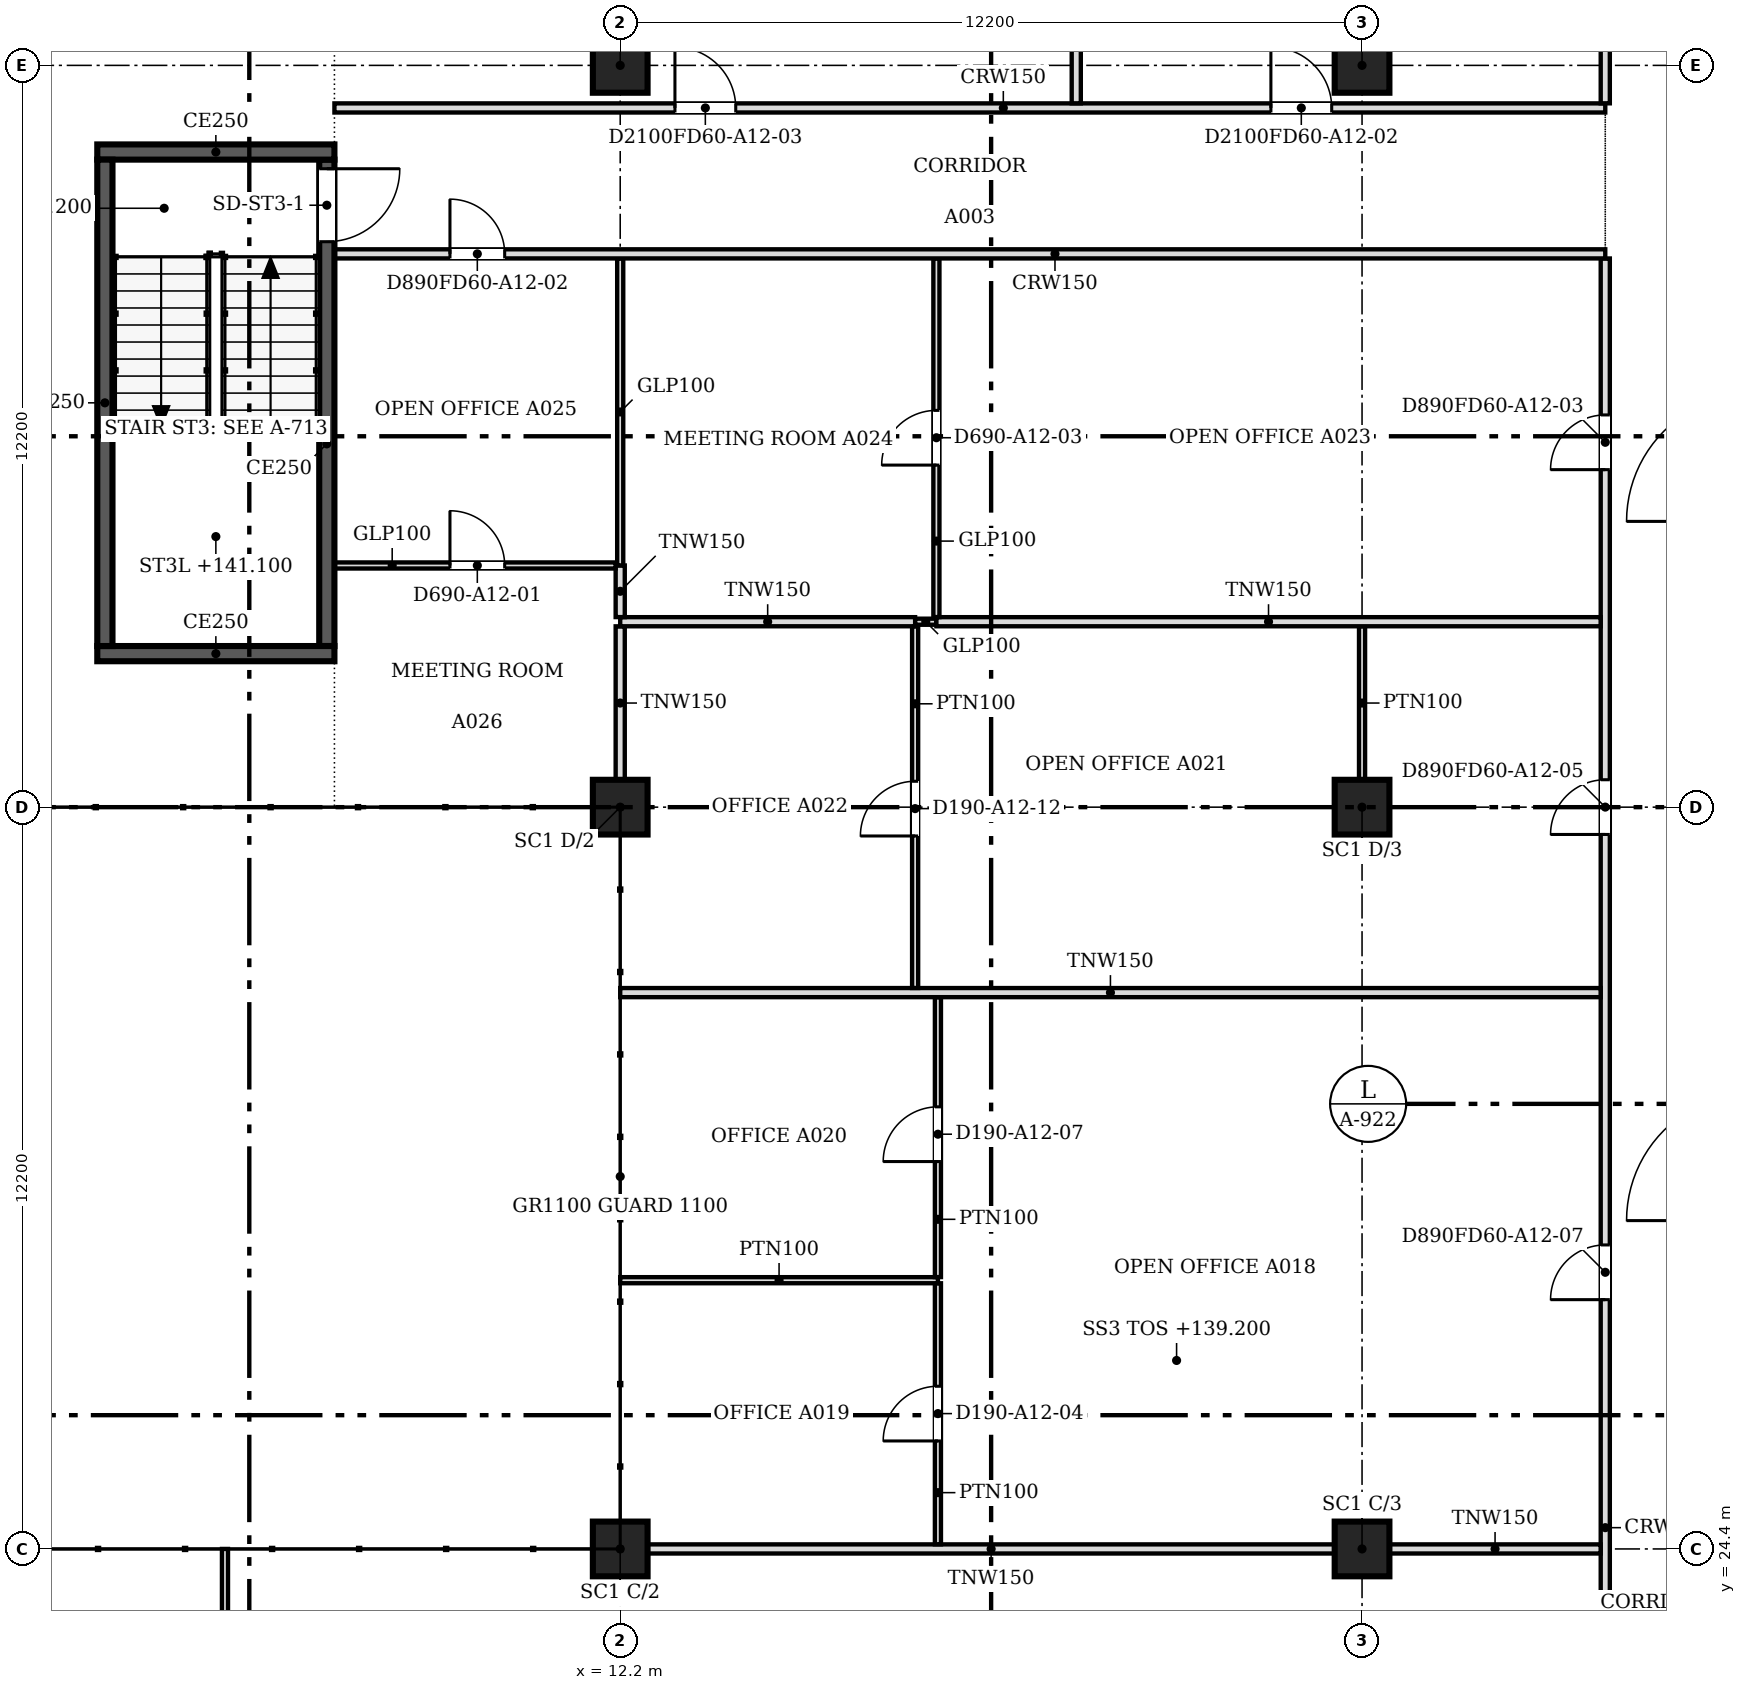
"""IFC4 building model, lengths in metres.
Left out: names, types, materials, properties, quantities, classifications, styles, units other than length and angle.
Written with IfcOpenShell. Run it as: python <this file> out.ifc"""

import sys

from ifc_helpers import new_model, si_unit, direction, frame, frame_2d, origin, origin_2d, place, context, subcontext, project, spatial, rectangle, extrude, source, transform, mapped, element, fill, save


model = new_model("IFC4")
c1 = context("Model", 3, precision=1e-05, world=origin(), true_north=direction((0.0, 1.0)))
c2 = subcontext(c1, "Body", "Model", "MODEL_VIEW")
j1 = project(units=[si_unit("LENGTHUNIT", "METRE"), si_unit("PLANEANGLEUNIT", "RADIAN")], contexts=[c1])
p1 = place(None, origin())
s1 = spatial("IfcSite", under=j1, at=p1, CompositionType="ELEMENT")
p2 = place(p1, origin())
s2 = spatial("IfcBuilding", under=s1, at=p2, CompositionType="ELEMENT")
p3 = place(p2, frame((0.0, 0.0, 139.2)))
s3 = spatial("IfcBuildingStorey", under=s2, at=p3, CompositionType="ELEMENT", Elevation=139.2)
for number, where, z_axis, x_axis in (
    (1, (12.2, 24.4, 0.0), (0.0, 0.0, 1.0), (1.0, 0.0, 0.0)),
    (2, (12.2, 36.6, 0.0), (0.0, 0.0, 1.0), (1.0, 0.0, 0.0)),
    (3, (12.2, 48.8, 0.0), (0.0, 0.0, 1.0), (1.0, 0.0, 0.0)),
    (4, (24.4, 24.4, 0.0), (0.0, 0.0, 1.0), (1.0, 0.0, 0.0)),
    (5, (24.4, 36.6, 0.0), (0.0, 0.0, 1.0), (1.0, 0.0, 0.0)),
    (6, (24.4, 48.8, 0.0), (0.0, 0.0, 1.0), (1.0, 0.0, 0.0)),
):
    element("IfcColumn", number, at=place(p3, frame(where, z_axis=z_axis, x_axis=x_axis)), inside=s3, PredefinedType="COLUMN", context=c2, shape_type="SweptSolid", body=[
        extrude(rectangle(XDim=0.9, YDim=0.9, at=origin_2d()), origin(), (0.0, 0.0, 1.0), 3.6),
    ])
p4 = place(p3, frame((7.5, 39.125, 0.0), z_axis=(0.0, 0.0, 1.0), x_axis=(-1.0, 0.0, 0.0)))
e7 = element("IfcWall", 7, at=p4, inside=s3, PredefinedType="SOLIDWALL", context=c2, shape_type="SweptSolid", body=[
    extrude(rectangle(XDim=3.9, YDim=0.25, at=frame_2d((1.95, 0.0))), origin(), (0.0, 0.0, 1.0), 3.8),
])
p5 = place(p3, frame((3.725, 39.25, 0.0), z_axis=(0.0, 0.0, 1.0), x_axis=(0.0, 1.0, 0.0)))
e8 = element("IfcWall", 8, at=p5, inside=s3, PredefinedType="SOLIDWALL", context=c2, shape_type="SweptSolid", body=[
    extrude(rectangle(XDim=8.0, YDim=0.25, at=frame_2d((4.0, 0.0))), origin(), (0.0, 0.0, 1.0), 3.8),
])
p6 = place(p3, frame((3.6, 47.375, 0.0), z_axis=(0.0, 0.0, 1.0), x_axis=(1.0, 0.0, 0.0)))
e9 = element("IfcWall", 9, at=p6, inside=s3, PredefinedType="SOLIDWALL", context=c2, shape_type="SweptSolid", body=[
    extrude(rectangle(XDim=3.9, YDim=0.25, at=frame_2d((1.95, 0.0))), origin(), (0.0, 0.0, 1.0), 3.8),
])
p7 = place(p3, frame((7.375, 47.25, 0.0), z_axis=(0.0, 0.0, 1.0), x_axis=(0.0, -1.0, 0.0)))
e10 = element("IfcWall", 10, at=p7, inside=s3, PredefinedType="SOLIDWALL", context=c2, shape_type="SweptSolid", body=[
    extrude(rectangle(XDim=8.0, YDim=0.25, at=frame_2d((4.0, 0.0))), origin(), (0.0, 0.0, 1.0), 3.8),
])
m1 = source(origin(), c2, "Body", "SweptSolid", [
    extrude(rectangle(XDim=1.2, YDim=2.1, at=frame_2d((0.6, 1.05))), frame((0.0, 0.135, 0.0), z_axis=(0.0, -1.0, 0.0), x_axis=(1.0, 0.0, 0.0)), (0.0, 0.0, 1.0), 0.27),
])
p8 = place(p7, frame((0.15, 0.0, 0.0)))
e11 = element("IfcOpeningElement", 11, at=p8, cuts=e10, PredefinedType="OPENING", context=c2, shape_type="MappedRepresentation", body=[
    mapped(m1, transform((0.0, 0.0, 0.0), scale=1.0)),
])
p9 = place(p3, frame((28.4, 18.8, 0.0), z_axis=(0.0, 0.0, 1.0), x_axis=(0.0, 1.0, 0.0)))
e12 = element("IfcWall", 12, at=p9, inside=s3, PredefinedType="PARTITIONING", context=c2, shape_type="SweptSolid", body=[
    extrude(rectangle(XDim=26.824, YDim=0.15, at=frame_2d((13.412, 0.0))), origin(), (0.0, 0.0, 1.0), 3.067),
])
m2 = source(origin(), c2, "Body", "SweptSolid", [
    extrude(rectangle(XDim=0.9, YDim=2.1, at=frame_2d((0.45, 1.05))), frame((0.0, 0.085, 0.0), z_axis=(0.0, -1.0, 0.0), x_axis=(1.0, 0.0, 0.0)), (0.0, 0.0, 1.0), 0.17),
])
p10 = place(p9, frame((1.3, 0.0, 0.0)))
e13 = element("IfcOpeningElement", 13, at=p10, cuts=e12, PredefinedType="OPENING", context=c2, shape_type="MappedRepresentation", body=[
    mapped(m2, transform((0.0, 0.0, 0.0), scale=1.0)),
])
p11 = place(p9, frame((23.351, 0.0, 0.0)))
e14 = element("IfcOpeningElement", 14, at=p11, cuts=e12, PredefinedType="OPENING", context=c2, shape_type="MappedRepresentation", body=[
    mapped(m2, transform((0.0, 0.0, 0.0), scale=1.0)),
])
p12 = place(p9, frame((17.351, 0.0, 0.0)))
e15 = element("IfcOpeningElement", 15, at=p12, cuts=e12, PredefinedType="OPENING", context=c2, shape_type="MappedRepresentation", body=[
    mapped(m2, transform((0.0, 0.0, 0.0), scale=1.0)),
])
p13 = place(p9, frame((9.7, 0.0, 0.0)))
e16 = element("IfcOpeningElement", 16, at=p13, cuts=e12, PredefinedType="OPENING", context=c2, shape_type="MappedRepresentation", body=[
    mapped(m2, transform((0.0, 0.0, 0.0), scale=1.0)),
])
p14 = place(p3, frame((5.7, 18.99, 0.0), z_axis=(0.0, 0.0, 1.0), x_axis=(0.0, 1.0, 0.0)))
e17 = element("IfcWall", 17, at=p14, inside=s3, PredefinedType="PARTITIONING", context=c2, shape_type="SweptSolid", body=[
    extrude(rectangle(XDim=5.41, YDim=0.1, at=frame_2d((2.705, 0.0))), origin(), (0.0, 0.0, 1.0), 3.067),
])
m3 = source(origin(), c2, "Body", "SweptSolid", [
    extrude(rectangle(XDim=0.9, YDim=2.1, at=frame_2d((0.45, 1.05))), frame((0.0, 0.06, 0.0), z_axis=(0.0, -1.0, 0.0), x_axis=(1.0, 0.0, 0.0)), (0.0, 0.0, 1.0), 0.12),
])
p15 = place(p14, frame((2.3, 0.0, 0.0)))
e18 = element("IfcOpeningElement", 18, at=p15, cuts=e17, PredefinedType="OPENING", context=c2, shape_type="MappedRepresentation", body=[
    mapped(m3, transform((0.0, 0.0, 0.0), scale=1.0)),
])
p16 = place(p3, frame((12.651, 24.4, 0.0), z_axis=(0.0, 0.0, 1.0), x_axis=(1.0, 0.0, 0.0)))
e19 = element("IfcWall", 19, at=p16, inside=s3, PredefinedType="PARTITIONING", context=c2, shape_type="SweptSolid", body=[
    extrude(rectangle(XDim=11.298, YDim=0.15, at=frame_2d((5.649, 0.0))), origin(), (0.0, 0.0, 1.0), 3.067),
])
p17 = place(p3, frame((24.851, 24.4, 0.0), z_axis=(0.0, 0.0, 1.0), x_axis=(1.0, 0.0, 0.0)))
e20 = element("IfcWall", 20, at=p17, inside=s3, PredefinedType="PARTITIONING", context=c2, shape_type="SweptSolid", body=[
    extrude(rectangle(XDim=3.473, YDim=0.15, at=frame_2d((1.736, 0.0))), origin(), (0.0, 0.0, 1.0), 3.067),
])
p18 = place(p3, frame((17.425, 24.476, 0.0), z_axis=(0.0, 0.0, 1.0), x_axis=(0.0, 1.0, 0.0)))
e21 = element("IfcWall", 21, at=p18, inside=s3, PredefinedType="PARTITIONING", context=c2, shape_type="SweptSolid", body=[
    extrude(rectangle(XDim=4.293, YDim=0.1, at=frame_2d((2.146, 0.0))), origin(), (0.0, 0.0, 1.0), 3.067),
])
p19 = place(p18, frame((1.7, 0.0, 0.0)))
e22 = element("IfcOpeningElement", 22, at=p19, cuts=e21, PredefinedType="OPENING", context=c2, shape_type="MappedRepresentation", body=[
    mapped(m3, transform((0.0, 0.0, 0.0), scale=1.0)),
])
p20 = place(p3, frame((12.2, 28.82, 0.0), z_axis=(0.0, 0.0, 1.0), x_axis=(1.0, 0.0, 0.0)))
e23 = element("IfcWall", 23, at=p20, inside=s3, PredefinedType="PARTITIONING", context=c2, shape_type="SweptSolid", body=[
    extrude(rectangle(XDim=5.225, YDim=0.1, at=frame_2d((2.613, 0.0))), origin(), (0.0, 0.0, 1.0), 3.067),
])
p21 = place(p3, frame((17.425, 28.871, 0.0), z_axis=(0.0, 0.0, 1.0), x_axis=(0.0, 1.0, 0.0)))
e24 = element("IfcWall", 24, at=p21, inside=s3, PredefinedType="PARTITIONING", context=c2, shape_type="SweptSolid", body=[
    extrude(rectangle(XDim=4.603, YDim=0.1, at=frame_2d((2.301, 0.0))), origin(), (0.0, 0.0, 1.0), 3.067),
])
p22 = place(p21, frame((1.9, 0.0, 0.0)))
e25 = element("IfcOpeningElement", 25, at=p22, cuts=e24, PredefinedType="OPENING", context=c2, shape_type="MappedRepresentation", body=[
    mapped(m3, transform((0.0, 0.0, 0.0), scale=1.0)),
])
p23 = place(p3, frame((12.2, 33.55, 0.0), z_axis=(0.0, 0.0, 1.0), x_axis=(1.0, 0.0, 0.0)))
e26 = element("IfcWall", 26, at=p23, inside=s3, PredefinedType="PARTITIONING", context=c2, shape_type="SweptSolid", body=[
    extrude(rectangle(XDim=16.124, YDim=0.15, at=frame_2d((8.062, 0.0))), origin(), (0.0, 0.0, 1.0), 3.067),
])
p24 = place(p3, frame((17.05, 33.626, 0.0), z_axis=(0.0, 0.0, 1.0), x_axis=(0.0, 1.0, 0.0)))
e27 = element("IfcWall", 27, at=p24, inside=s3, PredefinedType="PARTITIONING", context=c2, shape_type="SweptSolid", body=[
    extrude(rectangle(XDim=5.948, YDim=0.1, at=frame_2d((2.974, 0.0))), origin(), (0.0, 0.0, 1.0), 3.067),
])
p25 = place(p24, frame((2.5, 0.0, 0.0)))
e28 = element("IfcOpeningElement", 28, at=p25, cuts=e27, PredefinedType="OPENING", context=c2, shape_type="MappedRepresentation", body=[
    mapped(m3, transform((0.0, 0.0, 0.0), scale=1.0)),
])
p26 = place(p3, frame((12.2, 37.051, 0.0), z_axis=(0.0, 0.0, 1.0), x_axis=(0.0, 1.0, 0.0)))
e29 = element("IfcWall", 29, at=p26, inside=s3, PredefinedType="PARTITIONING", context=c2, shape_type="SweptSolid", body=[
    extrude(rectangle(XDim=2.523, YDim=0.15, at=frame_2d((1.261, 0.0))), origin(), (0.0, 0.0, 1.0), 3.067),
])
p27 = place(p3, frame((24.4, 37.05, 0.0), z_axis=(0.0, 0.0, 1.0), x_axis=(0.0, 1.0, 0.0)))
e30 = element("IfcWall", 30, at=p27, inside=s3, PredefinedType="PARTITIONING", context=c2, shape_type="SweptSolid", body=[
    extrude(rectangle(XDim=2.525, YDim=0.1, at=frame_2d((1.262, 0.0))), origin(), (0.0, 0.0, 1.0), 3.067),
])
p28 = place(p3, frame((12.2, 39.65, 0.0), z_axis=(0.0, 0.0, 1.0), x_axis=(1.0, 0.0, 0.0)))
e31 = element("IfcWall", 31, at=p28, inside=s3, PredefinedType="PARTITIONING", context=c2, shape_type="SweptSolid", body=[
    extrude(rectangle(XDim=4.85, YDim=0.15, at=frame_2d((2.425, 0.0))), origin(), (0.0, 0.0, 1.0), 3.067),
])
p29 = place(p3, frame((17.051, 39.65, 0.0), z_axis=(0.0, 0.0, 1.0), x_axis=(1.0, 0.0, 0.0)))
e32 = element("IfcWall", 32, at=p29, inside=s3, PredefinedType="PARTITIONING", context=c2, shape_type="SweptSolid", body=[
    extrude(rectangle(XDim=0.348, YDim=0.1, at=frame_2d((0.174, 0.0))), origin(), (0.0, 0.0, 1.0), 3.067),
])
p30 = place(p3, frame((17.4, 39.65, 0.0), z_axis=(0.0, 0.0, 1.0), x_axis=(1.0, 0.0, 0.0)))
e33 = element("IfcWall", 33, at=p30, inside=s3, PredefinedType="PARTITIONING", context=c2, shape_type="SweptSolid", body=[
    extrude(rectangle(XDim=10.924, YDim=0.15, at=frame_2d((5.462, 0.0))), origin(), (0.0, 0.0, 1.0), 3.067),
])
p31 = place(p3, frame((12.2, 39.726, 0.0), z_axis=(0.0, 0.0, 1.0), x_axis=(0.0, 1.0, 0.0)))
e34 = element("IfcWall", 34, at=p31, inside=s3, PredefinedType="PARTITIONING", context=c2, shape_type="SweptSolid", body=[
    extrude(rectangle(XDim=0.849, YDim=0.15, at=frame_2d((0.424, 0.0))), origin(), (0.0, 0.0, 1.0), 3.067),
])
p32 = place(p3, frame((17.4, 39.726, 0.0), z_axis=(0.0, 0.0, 1.0), x_axis=(0.0, 1.0, 0.0)))
e35 = element("IfcWall", 35, at=p32, inside=s3, PredefinedType="PARTITIONING", context=c2, shape_type="SweptSolid", body=[
    extrude(rectangle(XDim=5.898, YDim=0.1, at=frame_2d((2.949, 0.0))), origin(), (0.0, 0.0, 1.0), 3.067),
])
p33 = place(p32, frame((2.5, 0.0, 0.0)))
e36 = element("IfcOpeningElement", 36, at=p33, cuts=e35, PredefinedType="OPENING", context=c2, shape_type="MappedRepresentation", body=[
    mapped(m3, transform((0.0, 0.0, 0.0), scale=1.0)),
])
p34 = place(p3, frame((12.124, 40.575, 0.0), z_axis=(0.0, 0.0, 1.0), x_axis=(-1.0, 0.0, 0.0)))
e37 = element("IfcWall", 37, at=p34, inside=s3, PredefinedType="PARTITIONING", context=c2, shape_type="SweptSolid", body=[
    extrude(rectangle(XDim=4.624, YDim=0.1, at=frame_2d((2.312, 0.0))), origin(), (0.0, 0.0, 1.0), 3.067),
])
p35 = place(p34, frame((1.824, 0.0, 0.0)))
e38 = element("IfcOpeningElement", 38, at=p35, cuts=e37, PredefinedType="OPENING", context=c2, shape_type="MappedRepresentation", body=[
    mapped(m3, transform((0.0, 0.0, 0.0), scale=1.0)),
])
p36 = place(p3, frame((12.2, 40.576, 0.0), z_axis=(0.0, 0.0, 1.0), x_axis=(0.0, 1.0, 0.0)))
e39 = element("IfcWall", 39, at=p36, inside=s3, PredefinedType="PARTITIONING", context=c2, shape_type="SweptSolid", body=[
    extrude(rectangle(XDim=5.048, YDim=0.1, at=frame_2d((2.524, 0.0))), origin(), (0.0, 0.0, 1.0), 3.067),
])
p37 = place(p3, frame((28.4, 45.7, 0.0), z_axis=(0.0, 0.0, 1.0), x_axis=(-1.0, 0.0, 0.0)))
e40 = element("IfcWall", 40, at=p37, inside=s3, PredefinedType="PARTITIONING", context=c2, shape_type="SweptSolid", body=[
    extrude(rectangle(XDim=20.9, YDim=0.15, at=frame_2d((10.45, 0.0))), origin(), (0.0, 0.0, 1.0), 3.067),
])
p38 = place(p37, frame((18.1, 0.0, 0.0)))
e41 = element("IfcOpeningElement", 41, at=p38, cuts=e40, PredefinedType="OPENING", context=c2, shape_type="MappedRepresentation", body=[
    mapped(m2, transform((0.0, 0.0, 0.0), scale=1.0)),
])
p39 = place(p3, frame((7.5, 48.1, 0.0), z_axis=(0.0, 0.0, 1.0), x_axis=(1.0, 0.0, 0.0)))
e42 = element("IfcWall", 42, at=p39, inside=s3, PredefinedType="PARTITIONING", context=c2, shape_type="SweptSolid", body=[
    extrude(rectangle(XDim=20.9, YDim=0.15, at=frame_2d((10.45, 0.0))), origin(), (0.0, 0.0, 1.0), 3.067),
])
m4 = source(origin(), c2, "Body", "SweptSolid", [
    extrude(rectangle(XDim=1.0, YDim=2.1, at=frame_2d((0.5, 1.05))), frame((0.0, 0.085, 0.0), z_axis=(0.0, -1.0, 0.0), x_axis=(1.0, 0.0, 0.0)), (0.0, 0.0, 1.0), 0.17),
])
p40 = place(p39, frame((15.401, 0.0, 0.0)))
e43 = element("IfcOpeningElement", 43, at=p40, cuts=e42, PredefinedType="OPENING", context=c2, shape_type="MappedRepresentation", body=[
    mapped(m4, transform((0.0, 0.0, 0.0), scale=1.0)),
])
p41 = place(p39, frame((5.6, 0.0, 0.0)))
e44 = element("IfcOpeningElement", 44, at=p41, cuts=e42, PredefinedType="OPENING", context=c2, shape_type="MappedRepresentation", body=[
    mapped(m4, transform((0.0, 0.0, 0.0), scale=1.0)),
])
p42 = place(p3, frame((19.7, 48.176, 0.0), z_axis=(0.0, 0.0, 1.0), x_axis=(0.0, 1.0, 0.0)))
e45 = element("IfcWall", 45, at=p42, inside=s3, PredefinedType="PARTITIONING", context=c2, shape_type="SweptSolid", body=[
    extrude(rectangle(XDim=3.198, YDim=0.15, at=frame_2d((1.599, 0.0))), origin(), (0.0, 0.0, 1.0), 3.067),
])
p43 = place(p3, frame((28.4, 48.176, 0.0), z_axis=(0.0, 0.0, 1.0), x_axis=(0.0, 1.0, 0.0)))
e46 = element("IfcWall", 46, at=p43, inside=s3, PredefinedType="PARTITIONING", context=c2, shape_type="SweptSolid", body=[
    extrude(rectangle(XDim=2.648, YDim=0.15, at=frame_2d((1.324, 0.0))), origin(), (0.0, 0.0, 1.0), 3.067),
])
m5 = source(origin(), c2, "Body", "SweptSolid", [
    extrude(rectangle(XDim=1.2, YDim=2.1, at=frame_2d((0.6, 1.05))), frame((0.0, 0.025, 0.0), z_axis=(0.0, -1.0, 0.0), x_axis=(1.0, 0.0, 0.0)), (0.0, 0.0, 1.0), 0.05),
])
p44 = place(p8, origin())
e47 = element("IfcDoor", 47, at=p44, inside=s3, OperationType="SINGLE_SWING_LEFT", PredefinedType="DOOR", context=c2, shape_type="MappedRepresentation", body=[
    mapped(m5, transform((0.0, 0.0, 0.0), scale=1.0)),
])
fill(e11, e47)
m6 = source(origin(), c2, "Body", "SweptSolid", [
    extrude(rectangle(XDim=0.9, YDim=2.1, at=frame_2d((0.45, 1.05))), frame((0.0, 0.025, 0.0), z_axis=(0.0, -1.0, 0.0), x_axis=(1.0, 0.0, 0.0)), (0.0, 0.0, 1.0), 0.05),
])
p45 = place(p19, origin())
e48 = element("IfcDoor", 48, at=p45, inside=s3, OperationType="SINGLE_SWING_LEFT", PredefinedType="DOOR", context=c2, shape_type="MappedRepresentation", body=[
    mapped(m6, transform((0.0, 0.0, 0.0), scale=1.0)),
])
fill(e22, e48)
p46 = place(p22, origin())
e49 = element("IfcDoor", 49, at=p46, inside=s3, OperationType="SINGLE_SWING_LEFT", PredefinedType="DOOR", context=c2, shape_type="MappedRepresentation", body=[
    mapped(m6, transform((0.0, 0.0, 0.0), scale=1.0)),
])
fill(e25, e49)
p47 = place(p35, origin())
e50 = element("IfcDoor", 50, at=p47, inside=s3, OperationType="SINGLE_SWING_RIGHT", PredefinedType="DOOR", context=c2, shape_type="MappedRepresentation", body=[
    mapped(m6, transform((0.0, 0.0, 0.0), scale=1.0)),
])
fill(e38, e50)
p48 = place(p38, origin())
e51 = element("IfcDoor", 51, at=p48, inside=s3, OperationType="SINGLE_SWING_RIGHT", PredefinedType="DOOR", context=c2, shape_type="MappedRepresentation", body=[
    mapped(m6, transform((0.0, 0.0, 0.0), scale=1.0)),
])
fill(e41, e51)
p49 = place(p33, origin())
e52 = element("IfcDoor", 52, at=p49, inside=s3, OperationType="SINGLE_SWING_LEFT", PredefinedType="DOOR", context=c2, shape_type="MappedRepresentation", body=[
    mapped(m6, transform((0.0, 0.0, 0.0), scale=1.0)),
])
fill(e36, e52)
p50 = place(p25, origin())
e53 = element("IfcDoor", 53, at=p50, inside=s3, OperationType="SINGLE_SWING_LEFT", PredefinedType="DOOR", context=c2, shape_type="MappedRepresentation", body=[
    mapped(m6, transform((0.0, 0.0, 0.0), scale=1.0)),
])
fill(e28, e53)
p51 = place(p11, origin())
e54 = element("IfcDoor", 54, at=p51, inside=s3, OperationType="SINGLE_SWING_LEFT", PredefinedType="DOOR", context=c2, shape_type="MappedRepresentation", body=[
    mapped(m6, transform((0.0, 0.0, 0.0), scale=1.0)),
])
fill(e14, e54)
p52 = place(p12, origin())
e55 = element("IfcDoor", 55, at=p52, inside=s3, OperationType="SINGLE_SWING_LEFT", PredefinedType="DOOR", context=c2, shape_type="MappedRepresentation", body=[
    mapped(m6, transform((0.0, 0.0, 0.0), scale=1.0)),
])
fill(e15, e55)
m7 = source(origin(), c2, "Body", "SweptSolid", [
    extrude(rectangle(XDim=1.0, YDim=2.1, at=frame_2d((0.5, 1.05))), frame((0.0, 0.025, 0.0), z_axis=(0.0, -1.0, 0.0), x_axis=(1.0, 0.0, 0.0)), (0.0, 0.0, 1.0), 0.05),
])
p53 = place(p40, origin())
e56 = element("IfcDoor", 56, at=p53, inside=s3, OperationType="SINGLE_SWING_LEFT", PredefinedType="DOOR", context=c2, shape_type="MappedRepresentation", body=[
    mapped(m7, transform((0.0, 0.0, 0.0), scale=1.0)),
])
fill(e43, e56)
p54 = place(p13, origin())
e57 = element("IfcDoor", 57, at=p54, inside=s3, OperationType="SINGLE_SWING_LEFT", PredefinedType="DOOR", context=c2, shape_type="MappedRepresentation", body=[
    mapped(m6, transform((0.0, 0.0, 0.0), scale=1.0)),
])
fill(e16, e57)
p55 = place(p41, origin())
e58 = element("IfcDoor", 58, at=p55, inside=s3, OperationType="SINGLE_SWING_LEFT", PredefinedType="DOOR", context=c2, shape_type="MappedRepresentation", body=[
    mapped(m7, transform((0.0, 0.0, 0.0), scale=1.0)),
])
fill(e44, e58)
save(model, sys.argv[1])
